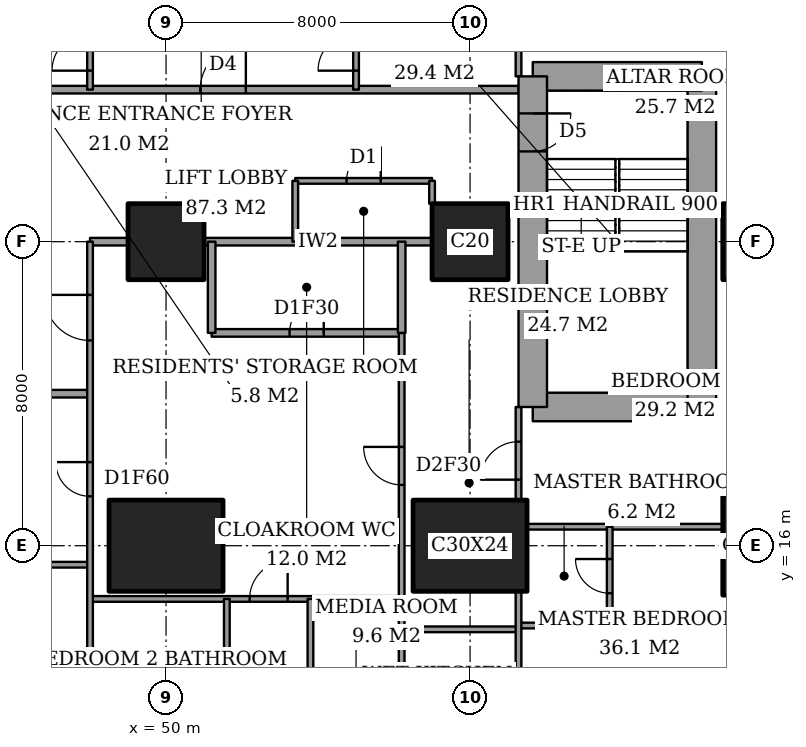
"""IFC4 building model, lengths in metres.
Left out: names, types, materials, properties, quantities, classifications, styles, units other than length and angle.
Written with IfcOpenShell. Run it as: python <this file> out.ifc"""

import sys

from ifc_helpers import new_model, si_unit, direction, frame, frame_2d, origin, origin_2d, place, context, subcontext, project, spatial, rectangle, extrude, element, fill, save


model = new_model("IFC4")
c1 = context("Model", 3, precision=1e-05, world=origin(), true_north=direction((0.0, 1.0)))
c2 = subcontext(c1, "Body", "Model", "MODEL_VIEW")
j1 = project(units=[si_unit("LENGTHUNIT", "METRE"), si_unit("PLANEANGLEUNIT", "RADIAN")], contexts=[c1])
p1 = place(None, origin())
s1 = spatial("IfcSite", under=j1, at=p1, CompositionType="ELEMENT")
p2 = place(p1, origin())
s2 = spatial("IfcBuilding", under=s1, at=p2, CompositionType="ELEMENT")
p3 = place(p2, frame((0.0, 0.0, 29.6)))
s3 = spatial("IfcBuildingStorey", under=s2, at=p3, CompositionType="ELEMENT", Elevation=29.6)
p4 = place(p3, frame((50.0, 16.0, 0.0), z_axis=(0.0, 0.0, 1.0), x_axis=(1.0, 0.0, 0.0)))
e1 = element("IfcColumn", 1, at=p4, inside=s3, PredefinedType="COLUMN", context=c2, shape_type="SweptSolid", body=[
    extrude(rectangle(XDim=3.0, YDim=2.4, at=origin_2d()), origin(), (0.0, 0.0, 1.0), 3.6),
])
p5 = place(p3, frame((50.0, 24.0, 0.0), z_axis=(0.0, 0.0, 1.0), x_axis=(1.0, 0.0, 0.0)))
e2 = element("IfcColumn", 2, at=p5, inside=s3, PredefinedType="COLUMN", context=c2, shape_type="SweptSolid", body=[
    extrude(rectangle(XDim=2.0, YDim=2.0, at=origin_2d()), origin(), (0.0, 0.0, 1.0), 3.6),
])
p6 = place(p3, frame((58.0, 16.0, 0.0), z_axis=(0.0, 0.0, 1.0), x_axis=(1.0, 0.0, 0.0)))
e3 = element("IfcColumn", 3, at=p6, inside=s3, PredefinedType="COLUMN", context=c2, shape_type="SweptSolid", body=[
    extrude(rectangle(XDim=3.0, YDim=2.4, at=origin_2d()), origin(), (0.0, 0.0, 1.0), 3.6),
])
p7 = place(p3, frame((58.0, 24.0, 0.0), z_axis=(0.0, 0.0, 1.0), x_axis=(1.0, 0.0, 0.0)))
e4 = element("IfcColumn", 4, at=p7, inside=s3, PredefinedType="COLUMN", context=c2, shape_type="SweptSolid", body=[
    extrude(rectangle(XDim=2.0, YDim=2.0, at=origin_2d()), origin(), (0.0, 0.0, 1.0), 3.6),
])
p8 = place(p3, frame((65.65, 16.0, 0.0), z_axis=(0.0, 0.0, 1.0), x_axis=(0.0, 1.0, 0.0)))
e5 = element("IfcColumn", 5, at=p8, inside=s3, PredefinedType="COLUMN", context=c2, shape_type="SweptSolid", body=[
    extrude(rectangle(XDim=2.6, YDim=2.0, at=origin_2d()), origin(), (0.0, 0.0, 1.0), 3.6),
])
p9 = place(p3, frame((65.65, 24.0, 0.0), z_axis=(0.0, 0.0, 1.0), x_axis=(1.0, 0.0, 0.0)))
e6 = element("IfcColumn", 6, at=p9, inside=s3, PredefinedType="COLUMN", context=c2, shape_type="SweptSolid", body=[
    extrude(rectangle(XDim=2.0, YDim=2.0, at=origin_2d()), origin(), (0.0, 0.0, 1.0), 3.6),
])
p10 = place(p3, frame((59.65, 19.65, 0.0), z_axis=(0.0, 0.0, 1.0), x_axis=(1.0, 0.0, 0.0)))
e7 = element("IfcWall", 7, at=p10, inside=s3, PredefinedType="SHEAR", context=c2, shape_type="SweptSolid", body=[
    extrude(rectangle(XDim=4.45, YDim=0.75, at=frame_2d((2.225, 0.0))), origin(), (0.0, 0.0, 1.0), 3.6),
])
p11 = place(p3, frame((64.1, 19.65, 0.0), z_axis=(0.0, 0.0, 1.0), x_axis=(0.0, 1.0, 0.0)))
e8 = element("IfcWall", 8, at=p11, inside=s3, PredefinedType="SHEAR", context=c2, shape_type="SweptSolid", body=[
    extrude(rectangle(XDim=8.7, YDim=0.75, at=frame_2d((4.35, 0.0))), origin(), (0.0, 0.0, 1.0), 3.6),
])
p12 = place(p3, frame((64.1, 28.35, 0.0), z_axis=(0.0, 0.0, 1.0), x_axis=(-1.0, 0.0, 0.0)))
e9 = element("IfcWall", 9, at=p12, inside=s3, PredefinedType="SHEAR", context=c2, shape_type="SweptSolid", body=[
    extrude(rectangle(XDim=4.45, YDim=0.75, at=frame_2d((2.225, 0.0))), origin(), (0.0, 0.0, 1.0), 3.6),
])
p13 = place(p3, frame((59.65, 28.35, 0.0), z_axis=(0.0, 0.0, 1.0), x_axis=(0.0, -1.0, 0.0)))
e10 = element("IfcWall", 10, at=p13, inside=s3, PredefinedType="SHEAR", context=c2, shape_type="SweptSolid", body=[
    extrude(rectangle(XDim=8.7, YDim=0.75, at=frame_2d((4.35, 0.0))), origin(), (0.0, 0.0, 1.0), 3.6),
])
p14 = place(p13, frame((0.975, 0.0, 0.0)))
e11 = element("IfcOpeningElement", 11, at=p14, cuts=e10, PredefinedType="OPENING", context=c2, shape_type="SweptSolid", body=[
    extrude(rectangle(XDim=1.0, YDim=2.1, at=frame_2d((0.5, 1.05))), frame((0.0, 0.385, 0.0), z_axis=(0.0, -1.0, 0.0), x_axis=(1.0, 0.0, 0.0)), (0.0, 0.0, 1.0), 0.77),
])
p15 = place(p3, frame((56.2, 13.8, 0.0), z_axis=(0.0, 0.0, 1.0), x_axis=(1.0, 0.0, 0.0)))
e12 = element("IfcWall", 12, at=p15, inside=s3, PredefinedType="PARTITIONING", context=c2, shape_type="SweptSolid", body=[
    extrude(rectangle(XDim=3.075, YDim=0.15, at=frame_2d((1.538, 0.0))), origin(), (0.0, 0.0, 1.0), 3.35),
])
p16 = place(p3, frame((59.275, 13.9, 0.0), z_axis=(0.0, 0.0, 1.0), x_axis=(1.0, 0.0, 0.0)))
e13 = element("IfcWall", 13, at=p16, inside=s3, PredefinedType="PARTITIONING", context=c2, shape_type="SweptSolid", body=[
    extrude(rectangle(XDim=2.4, YDim=0.15, at=frame_2d((1.2, 0.0))), origin(), (0.0, 0.0, 1.0), 3.35),
])
p17 = place(p3, frame((48.0, 14.6, 0.0), z_axis=(0.0, 0.0, 1.0), x_axis=(1.0, 0.0, 0.0)))
e14 = element("IfcWall", 14, at=p17, inside=s3, PredefinedType="PARTITIONING", context=c2, shape_type="SweptSolid", body=[
    extrude(rectangle(XDim=8.2, YDim=0.15, at=frame_2d((4.1, 0.0))), origin(), (0.0, 0.0, 1.0), 3.35),
])
p18 = place(p17, frame((4.2, 0.0, 0.0)))
e15 = element("IfcOpeningElement", 15, at=p18, cuts=e14, PredefinedType="OPENING", context=c2, shape_type="SweptSolid", body=[
    extrude(rectangle(XDim=1.0, YDim=2.1, at=frame_2d((0.5, 1.05))), frame((0.0, 0.085, 0.0), z_axis=(0.0, -1.0, 0.0), x_axis=(1.0, 0.0, 0.0)), (0.0, 0.0, 1.0), 0.17),
])
p19 = place(p3, frame((42.0, 15.5, 0.0), z_axis=(0.0, 0.0, 1.0), x_axis=(1.0, 0.0, 0.0)))
e16 = element("IfcWall", 16, at=p19, inside=s3, PredefinedType="PARTITIONING", context=c2, shape_type="SweptSolid", body=[
    extrude(rectangle(XDim=6.0, YDim=0.15, at=frame_2d((3.0, 0.0))), origin(), (0.0, 0.0, 1.0), 3.35),
])
p20 = place(p3, frame((59.5, 16.5, 0.0), z_axis=(0.0, 0.0, 1.0), x_axis=(1.0, 0.0, 0.0)))
e17 = element("IfcWall", 17, at=p20, inside=s3, PredefinedType="PARTITIONING", context=c2, shape_type="SweptSolid", body=[
    extrude(rectangle(XDim=5.15, YDim=0.15, at=frame_2d((2.575, 0.0))), origin(), (0.0, 0.0, 1.0), 3.35),
])
p21 = place(p3, frame((42.0, 20.0, 0.0), z_axis=(0.0, 0.0, 1.0), x_axis=(1.0, 0.0, 0.0)))
e18 = element("IfcWall", 18, at=p21, inside=s3, PredefinedType="PARTITIONING", context=c2, shape_type="SweptSolid", body=[
    extrude(rectangle(XDim=6.0, YDim=0.2, at=frame_2d((3.0, 0.0))), origin(), (0.0, 0.0, 1.0), 3.35),
])
p22 = place(p3, frame((51.2, 21.6, 0.0), z_axis=(0.0, 0.0, 1.0), x_axis=(1.0, 0.0, 0.0)))
e19 = element("IfcWall", 19, at=p22, inside=s3, PredefinedType="PARTITIONING", context=c2, shape_type="SweptSolid", body=[
    extrude(rectangle(XDim=5.0, YDim=0.2, at=frame_2d((2.5, 0.0))), origin(), (0.0, 0.0, 1.0), 3.35),
])
p23 = place(p22, frame((2.05, 0.0, 0.0)))
e20 = element("IfcOpeningElement", 20, at=p23, cuts=e19, PredefinedType="OPENING", context=c2, shape_type="SweptSolid", body=[
    extrude(rectangle(XDim=0.9, YDim=2.1, at=frame_2d((0.45, 1.05))), frame((0.0, 0.11, 0.0), z_axis=(0.0, -1.0, 0.0), x_axis=(1.0, 0.0, 0.0)), (0.0, 0.0, 1.0), 0.22),
])
p24 = place(p3, frame((48.0, 24.0, 0.0), z_axis=(0.0, 0.0, 1.0), x_axis=(1.0, 0.0, 0.0)))
e21 = element("IfcWall", 21, at=p24, inside=s3, PredefinedType="PARTITIONING", context=c2, shape_type="SweptSolid", body=[
    extrude(rectangle(XDim=1.0, YDim=0.2, at=frame_2d((0.5, 0.0))), origin(), (0.0, 0.0, 1.0), 3.35),
])
p25 = place(p3, frame((51.0, 24.0, 0.0), z_axis=(0.0, 0.0, 1.0), x_axis=(1.0, 0.0, 0.0)))
e22 = element("IfcWall", 22, at=p25, inside=s3, PredefinedType="PARTITIONING", context=c2, shape_type="SweptSolid", body=[
    extrude(rectangle(XDim=6.0, YDim=0.2, at=frame_2d((3.0, 0.0))), origin(), (0.0, 0.0, 1.0), 3.35),
])
p26 = place(p3, frame((53.4, 25.6, 0.0), z_axis=(0.0, 0.0, 1.0), x_axis=(1.0, 0.0, 0.0)))
e23 = element("IfcWall", 23, at=p26, inside=s3, PredefinedType="PARTITIONING", context=c2, shape_type="SweptSolid", body=[
    extrude(rectangle(XDim=3.6, YDim=0.15, at=frame_2d((1.8, 0.0))), origin(), (0.0, 0.0, 1.0), 3.35),
])
p27 = place(p26, frame((1.35, 0.0, 0.0)))
e24 = element("IfcOpeningElement", 24, at=p27, cuts=e23, PredefinedType="OPENING", context=c2, shape_type="SweptSolid", body=[
    extrude(rectangle(XDim=0.9, YDim=2.1, at=frame_2d((0.45, 1.05))), frame((0.0, 0.085, 0.0), z_axis=(0.0, -1.0, 0.0), x_axis=(1.0, 0.0, 0.0)), (0.0, 0.0, 1.0), 0.17),
])
p28 = place(p3, frame((42.0, 28.0, 0.0), z_axis=(0.0, 0.0, 1.0), x_axis=(1.0, 0.0, 0.0)))
e25 = element("IfcWall", 25, at=p28, inside=s3, PredefinedType="PARTITIONING", context=c2, shape_type="SweptSolid", body=[
    extrude(rectangle(XDim=17.275, YDim=0.2, at=frame_2d((8.637, 0.0))), origin(), (0.0, 0.0, 1.0), 3.35),
])
p29 = place(p28, frame((8.9, 0.0, 0.0)))
e26 = element("IfcOpeningElement", 26, at=p29, cuts=e25, PredefinedType="OPENING", context=c2, shape_type="SweptSolid", body=[
    extrude(rectangle(XDim=1.2, YDim=2.4, at=frame_2d((0.6, 1.2))), frame((0.0, 0.11, 0.0), z_axis=(0.0, -1.0, 0.0), x_axis=(1.0, 0.0, 0.0)), (0.0, 0.0, 1.0), 0.22),
])
p30 = place(p3, frame((48.0, 10.6, 0.0), z_axis=(0.0, 0.0, 1.0), x_axis=(0.0, 1.0, 0.0)))
e27 = element("IfcWall", 27, at=p30, inside=s3, PredefinedType="PARTITIONING", context=c2, shape_type="SweptSolid", body=[
    extrude(rectangle(XDim=13.4, YDim=0.15, at=frame_2d((6.7, 0.0))), origin(), (0.0, 0.0, 1.0), 3.35),
])
p31 = place(p30, frame((10.8, 0.0, 0.0)))
e28 = element("IfcOpeningElement", 28, at=p31, cuts=e27, PredefinedType="OPENING", context=c2, shape_type="SweptSolid", body=[
    extrude(rectangle(XDim=1.2, YDim=2.4, at=frame_2d((0.6, 1.2))), frame((0.0, 0.085, 0.0), z_axis=(0.0, -1.0, 0.0), x_axis=(1.0, 0.0, 0.0)), (0.0, 0.0, 1.0), 0.17),
])
p32 = place(p30, frame((6.7, 0.0, 0.0)))
e29 = element("IfcOpeningElement", 29, at=p32, cuts=e27, PredefinedType="OPENING", context=c2, shape_type="SweptSolid", body=[
    extrude(rectangle(XDim=0.9, YDim=2.1, at=frame_2d((0.45, 1.05))), frame((0.0, 0.085, 0.0), z_axis=(0.0, -1.0, 0.0), x_axis=(1.0, 0.0, 0.0)), (0.0, 0.0, 1.0), 0.17),
])
p33 = place(p3, frame((48.0, 28.0, 0.0), z_axis=(0.0, 0.0, 1.0), x_axis=(0.0, 1.0, 0.0)))
e30 = element("IfcWall", 30, at=p33, inside=s3, PredefinedType="PARTITIONING", context=c2, shape_type="SweptSolid", body=[
    extrude(rectangle(XDim=9.4, YDim=0.15, at=frame_2d((4.7, 0.0))), origin(), (0.0, 0.0, 1.0), 3.35),
])
p34 = place(p33, frame((0.5, 0.0, 0.0)))
e31 = element("IfcOpeningElement", 31, at=p34, cuts=e30, PredefinedType="OPENING", context=c2, shape_type="SweptSolid", body=[
    extrude(rectangle(XDim=1.0, YDim=2.1, at=frame_2d((0.5, 1.05))), frame((0.0, 0.085, 0.0), z_axis=(0.0, -1.0, 0.0), x_axis=(1.0, 0.0, 0.0)), (0.0, 0.0, 1.0), 0.17),
])
p35 = place(p3, frame((51.2, 21.6, 0.0), z_axis=(0.0, 0.0, 1.0), x_axis=(0.0, 1.0, 0.0)))
e32 = element("IfcWall", 32, at=p35, inside=s3, PredefinedType="PARTITIONING", context=c2, shape_type="SweptSolid", body=[
    extrude(rectangle(XDim=2.4, YDim=0.2, at=frame_2d((1.2, 0.0))), origin(), (0.0, 0.0, 1.0), 3.35),
])
p36 = place(p3, frame((51.6, 10.6, 0.0), z_axis=(0.0, 0.0, 1.0), x_axis=(0.0, 1.0, 0.0)))
e33 = element("IfcWall", 33, at=p36, inside=s3, PredefinedType="PARTITIONING", context=c2, shape_type="SweptSolid", body=[
    extrude(rectangle(XDim=4.0, YDim=0.15, at=frame_2d((2.0, 0.0))), origin(), (0.0, 0.0, 1.0), 3.35),
])
p37 = place(p3, frame((53.4, 24.0, 0.0), z_axis=(0.0, 0.0, 1.0), x_axis=(0.0, 1.0, 0.0)))
e34 = element("IfcWall", 34, at=p37, inside=s3, PredefinedType="PARTITIONING", context=c2, shape_type="SweptSolid", body=[
    extrude(rectangle(XDim=1.6, YDim=0.15, at=frame_2d((0.8, 0.0))), origin(), (0.0, 0.0, 1.0), 3.35),
])
p38 = place(p3, frame((53.8, 10.6, 0.0), z_axis=(0.0, 0.0, 1.0), x_axis=(0.0, 1.0, 0.0)))
e35 = element("IfcWall", 35, at=p38, inside=s3, PredefinedType="PARTITIONING", context=c2, shape_type="SweptSolid", body=[
    extrude(rectangle(XDim=4.0, YDim=0.15, at=frame_2d((2.0, 0.0))), origin(), (0.0, 0.0, 1.0), 3.35),
])
p39 = place(p3, frame((55.0, 28.0, 0.0), z_axis=(0.0, 0.0, 1.0), x_axis=(0.0, 1.0, 0.0)))
e36 = element("IfcWall", 36, at=p39, inside=s3, PredefinedType="PARTITIONING", context=c2, shape_type="SweptSolid", body=[
    extrude(rectangle(XDim=9.4, YDim=0.15, at=frame_2d((4.7, 0.0))), origin(), (0.0, 0.0, 1.0), 3.35),
])
p40 = place(p39, frame((0.5, 0.0, 0.0)))
e37 = element("IfcOpeningElement", 37, at=p40, cuts=e36, PredefinedType="OPENING", context=c2, shape_type="SweptSolid", body=[
    extrude(rectangle(XDim=1.0, YDim=2.1, at=frame_2d((0.5, 1.05))), frame((0.0, 0.085, 0.0), z_axis=(0.0, -1.0, 0.0), x_axis=(1.0, 0.0, 0.0)), (0.0, 0.0, 1.0), 0.17),
])
p41 = place(p3, frame((56.2, 21.6, 0.0), z_axis=(0.0, 0.0, 1.0), x_axis=(0.0, 1.0, 0.0)))
e38 = element("IfcWall", 38, at=p41, inside=s3, PredefinedType="PARTITIONING", context=c2, shape_type="SweptSolid", body=[
    extrude(rectangle(XDim=2.4, YDim=0.2, at=frame_2d((1.2, 0.0))), origin(), (0.0, 0.0, 1.0), 3.35),
])
p42 = place(p3, frame((56.2, 10.6, 0.0), z_axis=(0.0, 0.0, 1.0), x_axis=(0.0, 1.0, 0.0)))
e39 = element("IfcWall", 39, at=p42, inside=s3, PredefinedType="PARTITIONING", context=c2, shape_type="SweptSolid", body=[
    extrude(rectangle(XDim=11.0, YDim=0.15, at=frame_2d((5.5, 0.0))), origin(), (0.0, 0.0, 1.0), 3.35),
])
p43 = place(p42, frame((7.0, 0.0, 0.0)))
e40 = element("IfcOpeningElement", 40, at=p43, cuts=e39, PredefinedType="OPENING", context=c2, shape_type="SweptSolid", body=[
    extrude(rectangle(XDim=1.0, YDim=2.1, at=frame_2d((0.5, 1.05))), frame((0.0, 0.085, 0.0), z_axis=(0.0, -1.0, 0.0), x_axis=(1.0, 0.0, 0.0)), (0.0, 0.0, 1.0), 0.17),
])
p44 = place(p3, frame((57.0, 25.0, 0.0), z_axis=(0.0, 0.0, 1.0), x_axis=(0.0, 1.0, 0.0)))
e41 = element("IfcWall", 41, at=p44, inside=s3, PredefinedType="PARTITIONING", context=c2, shape_type="SweptSolid", body=[
    extrude(rectangle(XDim=0.6, YDim=0.15, at=frame_2d((0.3, 0.0))), origin(), (0.0, 0.0, 1.0), 3.35),
])
p45 = place(p3, frame((59.275, 10.6, 0.0), z_axis=(0.0, 0.0, 1.0), x_axis=(0.0, 1.0, 0.0)))
e42 = element("IfcWall", 42, at=p45, inside=s3, PredefinedType="PARTITIONING", context=c2, shape_type="SweptSolid", body=[
    extrude(rectangle(XDim=4.2, YDim=0.15, at=frame_2d((2.1, 0.0))), origin(), (0.0, 0.0, 1.0), 3.35),
])
p46 = place(p3, frame((59.275, 17.2, 0.0), z_axis=(0.0, 0.0, 1.0), x_axis=(0.0, 1.0, 0.0)))
e43 = element("IfcWall", 43, at=p46, inside=s3, PredefinedType="PARTITIONING", context=c2, shape_type="SweptSolid", body=[
    extrude(rectangle(XDim=2.45, YDim=0.15, at=frame_2d((1.225, 0.0))), origin(), (0.0, 0.0, 1.0), 3.35),
])
p47 = place(p46, frame((0.538, 0.0, 0.0)))
e44 = element("IfcOpeningElement", 44, at=p47, cuts=e43, PredefinedType="OPENING", context=c2, shape_type="SweptSolid", body=[
    extrude(rectangle(XDim=1.0, YDim=2.1, at=frame_2d((0.5, 1.05))), frame((0.0, 0.085, 0.0), z_axis=(0.0, -1.0, 0.0), x_axis=(1.0, 0.0, 0.0)), (0.0, 0.0, 1.0), 0.17),
])
p48 = place(p3, frame((59.275, 28.35, 0.0), z_axis=(0.0, 0.0, 1.0), x_axis=(0.0, 1.0, 0.0)))
e45 = element("IfcWall", 45, at=p48, inside=s3, PredefinedType="PARTITIONING", context=c2, shape_type="SweptSolid", body=[
    extrude(rectangle(XDim=2.45, YDim=0.15, at=frame_2d((1.225, 0.0))), origin(), (0.0, 0.0, 1.0), 3.35),
])
p49 = place(p48, frame((0.913, 0.0, 0.0)))
e46 = element("IfcOpeningElement", 46, at=p49, cuts=e45, PredefinedType="OPENING", context=c2, shape_type="SweptSolid", body=[
    extrude(rectangle(XDim=1.0, YDim=2.1, at=frame_2d((0.5, 1.05))), frame((0.0, 0.085, 0.0), z_axis=(0.0, -1.0, 0.0), x_axis=(1.0, 0.0, 0.0)), (0.0, 0.0, 1.0), 0.17),
])
p50 = place(p3, frame((61.675, 13.9, 0.0), z_axis=(0.0, 0.0, 1.0), x_axis=(0.0, 1.0, 0.0)))
e47 = element("IfcWall", 47, at=p50, inside=s3, PredefinedType="PARTITIONING", context=c2, shape_type="SweptSolid", body=[
    extrude(rectangle(XDim=2.6, YDim=0.15, at=frame_2d((1.3, 0.0))), origin(), (0.0, 0.0, 1.0), 3.35),
])
p51 = place(p50, frame((0.85, 0.0, 0.0)))
e48 = element("IfcOpeningElement", 48, at=p51, cuts=e47, PredefinedType="OPENING", context=c2, shape_type="SweptSolid", body=[
    extrude(rectangle(XDim=0.9, YDim=2.1, at=frame_2d((0.45, 1.05))), frame((0.0, 0.085, 0.0), z_axis=(0.0, -1.0, 0.0), x_axis=(1.0, 0.0, 0.0)), (0.0, 0.0, 1.0), 0.17),
])
p52 = place(p51, origin())
e49 = element("IfcDoor", 49, at=p52, inside=s3, OperationType="SINGLE_SWING_LEFT", PredefinedType="DOOR", context=c2, shape_type="SweptSolid", body=[
    extrude(rectangle(XDim=0.9, YDim=2.1, at=frame_2d((0.45, 1.05))), frame((0.0, 0.025, 0.0), z_axis=(0.0, -1.0, 0.0), x_axis=(1.0, 0.0, 0.0)), (0.0, 0.0, 1.0), 0.05),
])
fill(e48, e49)
p53 = place(p47, origin())
e50 = element("IfcDoor", 50, at=p53, inside=s3, OperationType="SINGLE_SWING_RIGHT", PredefinedType="DOOR", context=c2, shape_type="SweptSolid", body=[
    extrude(rectangle(XDim=1.0, YDim=2.1, at=frame_2d((0.5, 1.05))), frame((0.0, 0.025, 0.0), z_axis=(0.0, -1.0, 0.0), x_axis=(1.0, 0.0, 0.0)), (0.0, 0.0, 1.0), 0.05),
])
fill(e44, e50)
p54 = place(p43, origin())
e51 = element("IfcDoor", 51, at=p54, inside=s3, OperationType="SINGLE_SWING_LEFT", PredefinedType="DOOR", context=c2, shape_type="SweptSolid", body=[
    extrude(rectangle(XDim=1.0, YDim=2.1, at=frame_2d((0.5, 1.05))), frame((0.0, 0.025, 0.0), z_axis=(0.0, -1.0, 0.0), x_axis=(1.0, 0.0, 0.0)), (0.0, 0.0, 1.0), 0.05),
])
fill(e40, e51)
p55 = place(p23, origin())
e52 = element("IfcDoor", 52, at=p55, inside=s3, OperationType="SINGLE_SWING_LEFT", PredefinedType="DOOR", context=c2, shape_type="SweptSolid", body=[
    extrude(rectangle(XDim=0.9, YDim=2.1, at=frame_2d((0.45, 1.05))), frame((0.0, 0.025, 0.0), z_axis=(0.0, -1.0, 0.0), x_axis=(1.0, 0.0, 0.0)), (0.0, 0.0, 1.0), 0.05),
])
fill(e20, e52)
p56 = place(p31, origin())
e53 = element("IfcDoor", 53, at=p56, inside=s3, OperationType="SINGLE_SWING_LEFT", PredefinedType="DOOR", context=c2, shape_type="SweptSolid", body=[
    extrude(rectangle(XDim=1.2, YDim=2.4, at=frame_2d((0.6, 1.2))), frame((0.0, 0.025, 0.0), z_axis=(0.0, -1.0, 0.0), x_axis=(1.0, 0.0, 0.0)), (0.0, 0.0, 1.0), 0.05),
])
fill(e28, e53)
p57 = place(p18, origin())
e54 = element("IfcDoor", 54, at=p57, inside=s3, OperationType="SINGLE_SWING_LEFT", PredefinedType="DOOR", context=c2, shape_type="SweptSolid", body=[
    extrude(rectangle(XDim=1.0, YDim=2.1, at=frame_2d((0.5, 1.05))), frame((0.0, 0.025, 0.0), z_axis=(0.0, -1.0, 0.0), x_axis=(1.0, 0.0, 0.0)), (0.0, 0.0, 1.0), 0.05),
])
fill(e15, e54)
p58 = place(p32, origin())
e55 = element("IfcDoor", 55, at=p58, inside=s3, OperationType="SINGLE_SWING_LEFT", PredefinedType="DOOR", context=c2, shape_type="SweptSolid", body=[
    extrude(rectangle(XDim=0.9, YDim=2.1, at=frame_2d((0.45, 1.05))), frame((0.0, 0.025, 0.0), z_axis=(0.0, -1.0, 0.0), x_axis=(1.0, 0.0, 0.0)), (0.0, 0.0, 1.0), 0.05),
])
fill(e29, e55)
p59 = place(p40, origin())
e56 = element("IfcDoor", 56, at=p59, inside=s3, OperationType="SINGLE_SWING_RIGHT", PredefinedType="DOOR", context=c2, shape_type="SweptSolid", body=[
    extrude(rectangle(XDim=1.0, YDim=2.1, at=frame_2d((0.5, 1.05))), frame((0.0, 0.025, 0.0), z_axis=(0.0, -1.0, 0.0), x_axis=(1.0, 0.0, 0.0)), (0.0, 0.0, 1.0), 0.05),
])
fill(e37, e56)
p60 = place(p29, origin())
e57 = element("IfcDoor", 57, at=p60, inside=s3, OperationType="SINGLE_SWING_LEFT", PredefinedType="DOOR", context=c2, shape_type="SweptSolid", body=[
    extrude(rectangle(XDim=1.2, YDim=2.4, at=frame_2d((0.6, 1.2))), frame((0.0, 0.025, 0.0), z_axis=(0.0, -1.0, 0.0), x_axis=(1.0, 0.0, 0.0)), (0.0, 0.0, 1.0), 0.05),
])
fill(e26, e57)
p61 = place(p34, origin())
e58 = element("IfcDoor", 58, at=p61, inside=s3, OperationType="SINGLE_SWING_RIGHT", PredefinedType="DOOR", context=c2, shape_type="SweptSolid", body=[
    extrude(rectangle(XDim=1.0, YDim=2.1, at=frame_2d((0.5, 1.05))), frame((0.0, 0.025, 0.0), z_axis=(0.0, -1.0, 0.0), x_axis=(1.0, 0.0, 0.0)), (0.0, 0.0, 1.0), 0.05),
])
fill(e31, e58)
p62 = place(p27, origin())
e59 = element("IfcDoor", 59, at=p62, inside=s3, OperationType="SINGLE_SWING_LEFT", PredefinedType="DOOR", context=c2, shape_type="SweptSolid", body=[
    extrude(rectangle(XDim=0.9, YDim=2.1, at=frame_2d((0.45, 1.05))), frame((0.0, 0.025, 0.0), z_axis=(0.0, -1.0, 0.0), x_axis=(1.0, 0.0, 0.0)), (0.0, 0.0, 1.0), 0.05),
])
fill(e24, e59)
p63 = place(p14, origin())
e60 = element("IfcDoor", 60, at=p63, inside=s3, OperationType="SINGLE_SWING_RIGHT", PredefinedType="DOOR", context=c2, shape_type="SweptSolid", body=[
    extrude(rectangle(XDim=1.0, YDim=2.1, at=frame_2d((0.5, 1.05))), frame((0.0, 0.025, 0.0), z_axis=(0.0, -1.0, 0.0), x_axis=(1.0, 0.0, 0.0)), (0.0, 0.0, 1.0), 0.05),
])
fill(e11, e60)
save(model, sys.argv[1])
